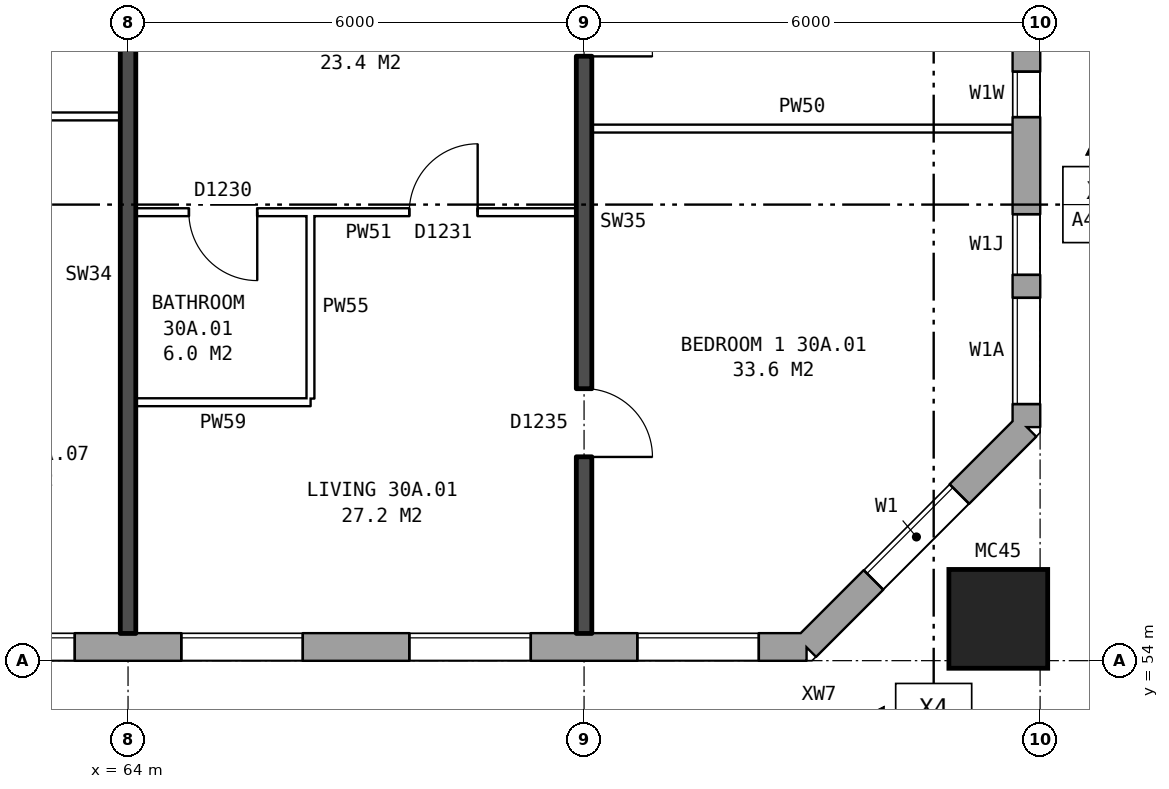
"""IFC4 building model, lengths in metres.
Left out: names, types, materials, properties, quantities, classifications, styles, units other than length and angle.
Written with IfcOpenShell. Run it as: python <this file> out.ifc"""

import sys

from ifc_helpers import new_model, si_unit, direction, frame, frame_2d, origin, origin_2d, place, context, subcontext, project, spatial, rectangle, hollow_rectangle, extrude, element, fill, save


model = new_model("IFC4")
c1 = context("Model", 3, precision=1e-05, world=origin(), true_north=direction((0.0, 1.0)))
c2 = subcontext(c1, "Body", "Model", "MODEL_VIEW")
j1 = project(units=[si_unit("LENGTHUNIT", "METRE"), si_unit("PLANEANGLEUNIT", "RADIAN")], contexts=[c1])
p1 = place(None, origin())
s1 = spatial("IfcSite", under=j1, at=p1, CompositionType="ELEMENT")
p2 = place(p1, origin())
s2 = spatial("IfcBuilding", under=s1, at=p2, CompositionType="ELEMENT")
p3 = place(p2, frame((0.0, 0.0, 108.8)))
s3 = spatial("IfcBuildingStorey", under=s2, at=p3, CompositionType="ELEMENT", Elevation=108.8)
p4 = place(p3, frame((75.45, 54.55, 0.0), z_axis=(0.0, 0.0, 1.0), x_axis=(1.0, 0.0, 0.0)))
e1 = element("IfcColumn", 1, at=p4, inside=s3, PredefinedType="COLUMN", context=c2, shape_type="SweptSolid", body=[
    extrude(hollow_rectangle(XDim=1.3, YDim=1.3, WallThickness=0.07, at=origin_2d()), origin(), (0.0, 0.0, 1.0), 3.1),
])
p5 = place(p3, frame((28.075, 54.18, 0.0), z_axis=(0.0, 0.0, 1.0), x_axis=(1.0, 0.0, 0.0)))
e2 = element("IfcWall", 2, at=p5, inside=s3, PredefinedType="STANDARD", context=c2, shape_type="SweptSolid", body=[
    extrude(rectangle(XDim=44.851, YDim=0.36, at=frame_2d((22.425, 0.0))), origin(), (0.0, 0.0, 1.0), 2.85),
])
p6 = place(p5, frame((0.625, 0.0, 0.8)))
e3 = element("IfcOpeningElement", 3, at=p6, cuts=e2, PredefinedType="OPENING", context=c2, shape_type="SweptSolid", body=[
    extrude(rectangle(XDim=1.6, YDim=1.8, at=frame_2d((0.8, 0.9))), frame((0.0, 0.19, 0.0), z_axis=(0.0, -1.0, 0.0), x_axis=(1.0, 0.0, 0.0)), (0.0, 0.0, 1.0), 0.38),
])
p7 = place(p5, frame((3.625, 0.0, 0.8)))
e4 = element("IfcOpeningElement", 4, at=p7, cuts=e2, PredefinedType="OPENING", context=c2, shape_type="SweptSolid", body=[
    extrude(rectangle(XDim=1.6, YDim=1.8, at=frame_2d((0.8, 0.9))), frame((0.0, 0.19, 0.0), z_axis=(0.0, -1.0, 0.0), x_axis=(1.0, 0.0, 0.0)), (0.0, 0.0, 1.0), 0.38),
])
p8 = place(p5, frame((6.625, 0.0, 0.8)))
e5 = element("IfcOpeningElement", 5, at=p8, cuts=e2, PredefinedType="OPENING", context=c2, shape_type="SweptSolid", body=[
    extrude(rectangle(XDim=1.6, YDim=1.8, at=frame_2d((0.8, 0.9))), frame((0.0, 0.19, 0.0), z_axis=(0.0, -1.0, 0.0), x_axis=(1.0, 0.0, 0.0)), (0.0, 0.0, 1.0), 0.38),
])
p9 = place(p5, frame((9.625, 0.0, 0.8)))
e6 = element("IfcOpeningElement", 6, at=p9, cuts=e2, PredefinedType="OPENING", context=c2, shape_type="SweptSolid", body=[
    extrude(rectangle(XDim=1.6, YDim=1.8, at=frame_2d((0.8, 0.9))), frame((0.0, 0.19, 0.0), z_axis=(0.0, -1.0, 0.0), x_axis=(1.0, 0.0, 0.0)), (0.0, 0.0, 1.0), 0.38),
])
p10 = place(p5, frame((12.625, 0.0, 0.8)))
e7 = element("IfcOpeningElement", 7, at=p10, cuts=e2, PredefinedType="OPENING", context=c2, shape_type="SweptSolid", body=[
    extrude(rectangle(XDim=1.6, YDim=1.8, at=frame_2d((0.8, 0.9))), frame((0.0, 0.19, 0.0), z_axis=(0.0, -1.0, 0.0), x_axis=(1.0, 0.0, 0.0)), (0.0, 0.0, 1.0), 0.38),
])
p11 = place(p5, frame((14.525, 0.0, 1.4)))
e8 = element("IfcOpeningElement", 8, at=p11, cuts=e2, PredefinedType="OPENING", context=c2, shape_type="SweptSolid", body=[
    extrude(rectangle(XDim=1.2, YDim=1.2, at=frame_2d((0.6, 0.6))), frame((0.0, 0.19, 0.0), z_axis=(0.0, -1.0, 0.0), x_axis=(1.0, 0.0, 0.0)), (0.0, 0.0, 1.0), 0.38),
])
p12 = place(p5, frame((18.625, 0.0, 0.8)))
e9 = element("IfcOpeningElement", 9, at=p12, cuts=e2, PredefinedType="OPENING", context=c2, shape_type="SweptSolid", body=[
    extrude(rectangle(XDim=1.6, YDim=1.8, at=frame_2d((0.8, 0.9))), frame((0.0, 0.19, 0.0), z_axis=(0.0, -1.0, 0.0), x_axis=(1.0, 0.0, 0.0)), (0.0, 0.0, 1.0), 0.38),
])
p13 = place(p5, frame((21.625, 0.0, 0.8)))
e10 = element("IfcOpeningElement", 10, at=p13, cuts=e2, PredefinedType="OPENING", context=c2, shape_type="SweptSolid", body=[
    extrude(rectangle(XDim=1.6, YDim=1.8, at=frame_2d((0.8, 0.9))), frame((0.0, 0.19, 0.0), z_axis=(0.0, -1.0, 0.0), x_axis=(1.0, 0.0, 0.0)), (0.0, 0.0, 1.0), 0.38),
])
p14 = place(p5, frame((24.625, 0.0, 0.8)))
e11 = element("IfcOpeningElement", 11, at=p14, cuts=e2, PredefinedType="OPENING", context=c2, shape_type="SweptSolid", body=[
    extrude(rectangle(XDim=1.6, YDim=1.8, at=frame_2d((0.8, 0.9))), frame((0.0, 0.19, 0.0), z_axis=(0.0, -1.0, 0.0), x_axis=(1.0, 0.0, 0.0)), (0.0, 0.0, 1.0), 0.38),
])
p15 = place(p5, frame((27.075, 0.0, 0.15)))
e12 = element("IfcOpeningElement", 12, at=p15, cuts=e2, PredefinedType="OPENING", context=c2, shape_type="SweptSolid", body=[
    extrude(rectangle(XDim=1.2, YDim=0.9, at=frame_2d((0.6, 0.45))), frame((0.0, 0.19, 0.0), z_axis=(0.0, -1.0, 0.0), x_axis=(1.0, 0.0, 0.0)), (0.0, 0.0, 1.0), 0.38),
])
p16 = place(p5, frame((30.625, 0.0, 0.8)))
e13 = element("IfcOpeningElement", 13, at=p16, cuts=e2, PredefinedType="OPENING", context=c2, shape_type="SweptSolid", body=[
    extrude(rectangle(XDim=1.6, YDim=1.8, at=frame_2d((0.8, 0.9))), frame((0.0, 0.19, 0.0), z_axis=(0.0, -1.0, 0.0), x_axis=(1.0, 0.0, 0.0)), (0.0, 0.0, 1.0), 0.38),
])
p17 = place(p5, frame((33.625, 0.0, 0.8)))
e14 = element("IfcOpeningElement", 14, at=p17, cuts=e2, PredefinedType="OPENING", context=c2, shape_type="SweptSolid", body=[
    extrude(rectangle(XDim=1.6, YDim=1.8, at=frame_2d((0.8, 0.9))), frame((0.0, 0.19, 0.0), z_axis=(0.0, -1.0, 0.0), x_axis=(1.0, 0.0, 0.0)), (0.0, 0.0, 1.0), 0.38),
])
p18 = place(p5, frame((36.625, 0.0, 0.8)))
e15 = element("IfcOpeningElement", 15, at=p18, cuts=e2, PredefinedType="OPENING", context=c2, shape_type="SweptSolid", body=[
    extrude(rectangle(XDim=1.6, YDim=1.8, at=frame_2d((0.8, 0.9))), frame((0.0, 0.19, 0.0), z_axis=(0.0, -1.0, 0.0), x_axis=(1.0, 0.0, 0.0)), (0.0, 0.0, 1.0), 0.38),
])
p19 = place(p5, frame((39.625, 0.0, 0.8)))
e16 = element("IfcOpeningElement", 16, at=p19, cuts=e2, PredefinedType="OPENING", context=c2, shape_type="SweptSolid", body=[
    extrude(rectangle(XDim=1.6, YDim=1.8, at=frame_2d((0.8, 0.9))), frame((0.0, 0.19, 0.0), z_axis=(0.0, -1.0, 0.0), x_axis=(1.0, 0.0, 0.0)), (0.0, 0.0, 1.0), 0.38),
])
p20 = place(p5, frame((42.625, 0.0, 0.8)))
e17 = element("IfcOpeningElement", 17, at=p20, cuts=e2, PredefinedType="OPENING", context=c2, shape_type="SweptSolid", body=[
    extrude(rectangle(XDim=1.6, YDim=1.8, at=frame_2d((0.8, 0.9))), frame((0.0, 0.19, 0.0), z_axis=(0.0, -1.0, 0.0), x_axis=(1.0, 0.0, 0.0)), (0.0, 0.0, 1.0), 0.38),
])
p21 = place(p5, frame((28.725, 0.0, 1.65)))
e18 = element("IfcOpeningElement", 18, at=p21, cuts=e2, PredefinedType="OPENING", context=c2, shape_type="SweptSolid", body=[
    extrude(rectangle(XDim=1.0, YDim=0.9, at=frame_2d((0.5, 0.45))), frame((0.0, 0.19, 0.0), z_axis=(0.0, -1.0, 0.0), x_axis=(1.0, 0.0, 0.0)), (0.0, 0.0, 1.0), 0.38),
])
p22 = place(p3, frame((72.925, 54.18, 0.0), z_axis=(0.0, 0.0, 1.0), x_axis=(0.707106781187, 0.707106781187, 0.0)))
e19 = element("IfcWall", 19, at=p22, inside=s3, PredefinedType="STANDARD", context=c2, shape_type="SweptSolid", body=[
    extrude(rectangle(XDim=4.094, YDim=0.36, at=frame_2d((2.047, 0.0))), origin(), (0.0, 0.0, 1.0), 2.85),
])
p23 = place(p22, frame((1.247, 0.0, 0.8)))
e20 = element("IfcOpeningElement", 20, at=p23, cuts=e19, PredefinedType="OPENING", context=c2, shape_type="SweptSolid", body=[
    extrude(rectangle(XDim=1.6, YDim=1.8, at=frame_2d((0.8, 0.9))), frame((0.0, 0.19, 0.0), z_axis=(0.0, -1.0, 0.0), x_axis=(1.0, 0.0, 0.0)), (0.0, 0.0, 1.0), 0.38),
])
p24 = place(p3, frame((75.82, 57.075, 0.0), z_axis=(0.0, 0.0, 1.0), x_axis=(0.0, 1.0, 0.0)))
e21 = element("IfcWall", 21, at=p24, inside=s3, PredefinedType="STANDARD", context=c2, shape_type="SweptSolid", body=[
    extrude(rectangle(XDim=25.851, YDim=0.36, at=frame_2d((12.925, 0.0))), origin(), (0.0, 0.0, 1.0), 2.85),
])
p25 = place(p24, frame((0.3, 0.0, 0.8)))
e22 = element("IfcOpeningElement", 22, at=p25, cuts=e21, PredefinedType="OPENING", context=c2, shape_type="SweptSolid", body=[
    extrude(rectangle(XDim=1.4, YDim=1.8, at=frame_2d((0.7, 0.9))), frame((0.0, 0.19, 0.0), z_axis=(0.0, -1.0, 0.0), x_axis=(1.0, 0.0, 0.0)), (0.0, 0.0, 1.0), 0.38),
])
p26 = place(p24, frame((4.075, 0.0, 0.25)))
e23 = element("IfcOpeningElement", 23, at=p26, cuts=e21, PredefinedType="OPENING", context=c2, shape_type="SweptSolid", body=[
    extrude(rectangle(XDim=0.6, YDim=0.9, at=frame_2d((0.3, 0.45))), frame((0.0, 0.19, 0.0), z_axis=(0.0, -1.0, 0.0), x_axis=(1.0, 0.0, 0.0)), (0.0, 0.0, 1.0), 0.38),
])
p27 = place(p24, frame((19.225, 0.0, 1.7)))
e24 = element("IfcOpeningElement", 24, at=p27, cuts=e21, PredefinedType="OPENING", context=c2, shape_type="SweptSolid", body=[
    extrude(rectangle(XDim=1.6, YDim=0.9, at=frame_2d((0.8, 0.45))), frame((0.0, 0.19, 0.0), z_axis=(0.0, -1.0, 0.0), x_axis=(1.0, 0.0, 0.0)), (0.0, 0.0, 1.0), 0.38),
])
p28 = place(p24, frame((21.975, 0.0, 0.8)))
e25 = element("IfcOpeningElement", 25, at=p28, cuts=e21, PredefinedType="OPENING", context=c2, shape_type="SweptSolid", body=[
    extrude(rectangle(XDim=1.2, YDim=0.9, at=frame_2d((0.6, 0.45))), frame((0.0, 0.19, 0.0), z_axis=(0.0, -1.0, 0.0), x_axis=(1.0, 0.0, 0.0)), (0.0, 0.0, 1.0), 0.38),
])
p29 = place(p24, frame((2.0, 0.0, 0.8)))
e26 = element("IfcOpeningElement", 26, at=p29, cuts=e21, PredefinedType="OPENING", context=c2, shape_type="SweptSolid", body=[
    extrude(rectangle(XDim=0.8, YDim=1.5, at=frame_2d((0.4, 0.75))), frame((0.0, 0.19, 0.0), z_axis=(0.0, -1.0, 0.0), x_axis=(1.0, 0.0, 0.0)), (0.0, 0.0, 1.0), 0.38),
])
p30 = place(p24, frame((5.075, 0.0, 1.65)))
e27 = element("IfcOpeningElement", 27, at=p30, cuts=e21, PredefinedType="OPENING", context=c2, shape_type="SweptSolid", body=[
    extrude(rectangle(XDim=1.4, YDim=0.9, at=frame_2d((0.7, 0.45))), frame((0.0, 0.19, 0.0), z_axis=(0.0, -1.0, 0.0), x_axis=(1.0, 0.0, 0.0)), (0.0, 0.0, 1.0), 0.38),
])
p31 = place(p24, frame((23.475, 0.0, 0.8)))
e28 = element("IfcOpeningElement", 28, at=p31, cuts=e21, PredefinedType="OPENING", context=c2, shape_type="SweptSolid", body=[
    extrude(rectangle(XDim=1.2, YDim=1.8, at=frame_2d((0.6, 0.9))), frame((0.0, 0.19, 0.0), z_axis=(0.0, -1.0, 0.0), x_axis=(1.0, 0.0, 0.0)), (0.0, 0.0, 1.0), 0.38),
])
p32 = place(p3, frame((64.1, 57.4, 0.0), z_axis=(0.0, 0.0, 1.0), x_axis=(1.0, 0.0, 0.0)))
e29 = element("IfcWall", 29, at=p32, inside=s3, PredefinedType="PARTITIONING", context=c2, shape_type="SweptSolid", body=[
    extrude(rectangle(XDim=2.3, YDim=0.1, at=frame_2d((1.15, 0.0))), origin(), (0.0, 0.0, 1.0), 2.85),
])
p33 = place(p3, frame((64.1, 59.9, 0.0), z_axis=(0.0, 0.0, 1.0), x_axis=(1.0, 0.0, 0.0)))
e30 = element("IfcWall", 30, at=p33, inside=s3, PredefinedType="PARTITIONING", context=c2, shape_type="SweptSolid", body=[
    extrude(rectangle(XDim=5.8, YDim=0.1, at=frame_2d((2.9, 0.0))), origin(), (0.0, 0.0, 1.0), 2.85),
])
p34 = place(p33, frame((3.6, 0.0, 0.0)))
e31 = element("IfcOpeningElement", 31, at=p34, cuts=e30, PredefinedType="OPENING", context=c2, shape_type="SweptSolid", body=[
    extrude(rectangle(XDim=0.9, YDim=2.1, at=frame_2d((0.45, 1.05))), frame((0.0, 0.06, 0.0), z_axis=(0.0, -1.0, 0.0), x_axis=(1.0, 0.0, 0.0)), (0.0, 0.0, 1.0), 0.12),
])
p35 = place(p33, frame((0.7, 0.0, 0.0)))
e32 = element("IfcOpeningElement", 32, at=p35, cuts=e30, PredefinedType="OPENING", context=c2, shape_type="SweptSolid", body=[
    extrude(rectangle(XDim=0.9, YDim=2.1, at=frame_2d((0.45, 1.05))), frame((0.0, 0.06, 0.0), z_axis=(0.0, -1.0, 0.0), x_axis=(1.0, 0.0, 0.0)), (0.0, 0.0, 1.0), 0.12),
])
p36 = place(p3, frame((70.1, 61.0, 0.0), z_axis=(0.0, 0.0, 1.0), x_axis=(1.0, 0.0, 0.0)))
e33 = element("IfcWall", 33, at=p36, inside=s3, PredefinedType="PARTITIONING", context=c2, shape_type="SweptSolid", body=[
    extrude(rectangle(XDim=5.54, YDim=0.1, at=frame_2d((2.77, 0.0))), origin(), (0.0, 0.0, 1.0), 2.85),
])
p37 = place(p3, frame((61.0, 61.16, 0.0), z_axis=(0.0, 0.0, 1.0), x_axis=(1.0, 0.0, 0.0)))
e34 = element("IfcWall", 34, at=p37, inside=s3, PredefinedType="PARTITIONING", context=c2, shape_type="SweptSolid", body=[
    extrude(rectangle(XDim=2.9, YDim=0.1, at=frame_2d((1.45, 0.0))), origin(), (0.0, 0.0, 1.0), 2.85),
])
p38 = place(p37, frame((1.0, 0.0, 0.0)))
e35 = element("IfcOpeningElement", 35, at=p38, cuts=e34, PredefinedType="OPENING", context=c2, shape_type="SweptSolid", body=[
    extrude(rectangle(XDim=0.9, YDim=2.1, at=frame_2d((0.45, 1.05))), frame((0.0, 0.06, 0.0), z_axis=(0.0, -1.0, 0.0), x_axis=(1.0, 0.0, 0.0)), (0.0, 0.0, 1.0), 0.12),
])
p39 = place(p3, frame((64.0, 54.36, 0.0), z_axis=(0.0, 0.0, 1.0), x_axis=(0.0, 1.0, 0.0)))
e36 = element("IfcWall", 36, at=p39, inside=s3, PredefinedType="SOLIDWALL", context=c2, shape_type="SweptSolid", body=[
    extrude(rectangle(XDim=9.44, YDim=0.2, at=frame_2d((4.72, 0.0))), origin(), (0.0, 0.0, 1.0), 2.85),
])
p40 = place(p3, frame((66.4, 57.45, 0.0), z_axis=(0.0, 0.0, 1.0), x_axis=(0.0, 1.0, 0.0)))
e37 = element("IfcWall", 37, at=p40, inside=s3, PredefinedType="PARTITIONING", context=c2, shape_type="SweptSolid", body=[
    extrude(rectangle(XDim=2.4, YDim=0.1, at=frame_2d((1.2, 0.0))), origin(), (0.0, 0.0, 1.0), 2.85),
])
p41 = place(p3, frame((70.0, 54.36, 0.0), z_axis=(0.0, 0.0, 1.0), x_axis=(0.0, 1.0, 0.0)))
e38 = element("IfcWall", 38, at=p41, inside=s3, PredefinedType="SOLIDWALL", context=c2, shape_type="SweptSolid", body=[
    extrude(rectangle(XDim=9.44, YDim=0.2, at=frame_2d((4.72, 0.0))), origin(), (0.0, 0.0, 1.0), 2.85),
])
p42 = place(p41, frame((2.32, 0.0, 0.0)))
e39 = element("IfcOpeningElement", 39, at=p42, cuts=e38, PredefinedType="OPENING", context=c2, shape_type="SweptSolid", body=[
    extrude(rectangle(XDim=0.9, YDim=2.1, at=frame_2d((0.45, 1.05))), frame((0.0, 0.11, 0.0), z_axis=(0.0, -1.0, 0.0), x_axis=(1.0, 0.0, 0.0)), (0.0, 0.0, 1.0), 0.22),
])
p43 = place(p41, frame((7.59, 0.0, 0.0)))
e40 = element("IfcOpeningElement", 40, at=p43, cuts=e38, PredefinedType="OPENING", context=c2, shape_type="SweptSolid", body=[
    extrude(rectangle(XDim=0.9, YDim=2.1, at=frame_2d((0.45, 1.05))), frame((0.0, 0.11, 0.0), z_axis=(0.0, -1.0, 0.0), x_axis=(1.0, 0.0, 0.0)), (0.0, 0.0, 1.0), 0.22),
])
p44 = place(p17, origin())
e41 = element("IfcWindow", 41, at=p44, inside=s3, PartitioningType="SINGLE_PANEL", PredefinedType="WINDOW", context=c2, shape_type="SweptSolid", body=[
    extrude(rectangle(XDim=1.6, YDim=1.8, at=frame_2d((0.8, 0.9))), frame((0.0, 0.15, 0.0), z_axis=(0.0, -1.0, 0.0), x_axis=(1.0, 0.0, 0.0)), (0.0, 0.0, 1.0), 0.06),
])
fill(e14, e41)
p45 = place(p18, origin())
e42 = element("IfcWindow", 42, at=p45, inside=s3, PartitioningType="SINGLE_PANEL", PredefinedType="WINDOW", context=c2, shape_type="SweptSolid", body=[
    extrude(rectangle(XDim=1.6, YDim=1.8, at=frame_2d((0.8, 0.9))), frame((0.0, 0.15, 0.0), z_axis=(0.0, -1.0, 0.0), x_axis=(1.0, 0.0, 0.0)), (0.0, 0.0, 1.0), 0.06),
])
fill(e15, e42)
p46 = place(p19, origin())
e43 = element("IfcWindow", 43, at=p46, inside=s3, PartitioningType="SINGLE_PANEL", PredefinedType="WINDOW", context=c2, shape_type="SweptSolid", body=[
    extrude(rectangle(XDim=1.6, YDim=1.8, at=frame_2d((0.8, 0.9))), frame((0.0, 0.15, 0.0), z_axis=(0.0, -1.0, 0.0), x_axis=(1.0, 0.0, 0.0)), (0.0, 0.0, 1.0), 0.06),
])
fill(e16, e43)
p47 = place(p20, origin())
e44 = element("IfcWindow", 44, at=p47, inside=s3, PartitioningType="SINGLE_PANEL", PredefinedType="WINDOW", context=c2, shape_type="SweptSolid", body=[
    extrude(rectangle(XDim=1.6, YDim=1.8, at=frame_2d((0.8, 0.9))), frame((0.0, 0.15, 0.0), z_axis=(0.0, -1.0, 0.0), x_axis=(1.0, 0.0, 0.0)), (0.0, 0.0, 1.0), 0.06),
])
fill(e17, e44)
p48 = place(p23, origin())
e45 = element("IfcWindow", 45, at=p48, inside=s3, PartitioningType="SINGLE_PANEL", PredefinedType="WINDOW", context=c2, shape_type="SweptSolid", body=[
    extrude(rectangle(XDim=1.6, YDim=1.8, at=frame_2d((0.8, 0.9))), frame((0.0, 0.15, 0.0), z_axis=(0.0, -1.0, 0.0), x_axis=(1.0, 0.0, 0.0)), (0.0, 0.0, 1.0), 0.06),
])
fill(e20, e45)
p49 = place(p25, origin())
e46 = element("IfcWindow", 46, at=p49, inside=s3, PartitioningType="SINGLE_PANEL", PredefinedType="WINDOW", context=c2, shape_type="SweptSolid", body=[
    extrude(rectangle(XDim=1.4, YDim=1.8, at=frame_2d((0.7, 0.9))), frame((0.0, 0.15, 0.0), z_axis=(0.0, -1.0, 0.0), x_axis=(1.0, 0.0, 0.0)), (0.0, 0.0, 1.0), 0.06),
])
fill(e22, e46)
p50 = place(p26, origin())
e47 = element("IfcWindow", 47, at=p50, inside=s3, PartitioningType="SINGLE_PANEL", PredefinedType="WINDOW", context=c2, shape_type="SweptSolid", body=[
    extrude(rectangle(XDim=0.6, YDim=0.9, at=frame_2d((0.3, 0.45))), frame((0.0, 0.15, 0.0), z_axis=(0.0, -1.0, 0.0), x_axis=(1.0, 0.0, 0.0)), (0.0, 0.0, 1.0), 0.06),
])
fill(e23, e47)
p51 = place(p42, frame((0.9, 0.0, 0.0), z_axis=(0.0, 0.0, 1.0), x_axis=(-1.0, 0.0, 0.0)))
e48 = element("IfcDoor", 48, at=p51, inside=s3, OperationType="SINGLE_SWING_RIGHT", PredefinedType="DOOR", context=c2, shape_type="SweptSolid", body=[
    extrude(rectangle(XDim=0.9, YDim=2.1, at=frame_2d((0.45, 1.05))), frame((0.0, 0.025, 0.0), z_axis=(0.0, -1.0, 0.0), x_axis=(1.0, 0.0, 0.0)), (0.0, 0.0, 1.0), 0.05),
])
fill(e39, e48)
p52 = place(p43, frame((0.9, 0.0, 0.0), z_axis=(0.0, 0.0, 1.0), x_axis=(-1.0, 0.0, 0.0)))
e49 = element("IfcDoor", 49, at=p52, inside=s3, OperationType="SINGLE_SWING_RIGHT", PredefinedType="DOOR", context=c2, shape_type="SweptSolid", body=[
    extrude(rectangle(XDim=0.9, YDim=2.1, at=frame_2d((0.45, 1.05))), frame((0.0, 0.025, 0.0), z_axis=(0.0, -1.0, 0.0), x_axis=(1.0, 0.0, 0.0)), (0.0, 0.0, 1.0), 0.05),
])
fill(e40, e49)
p53 = place(p34, origin())
e50 = element("IfcDoor", 50, at=p53, inside=s3, OperationType="SINGLE_SWING_RIGHT", PredefinedType="DOOR", context=c2, shape_type="SweptSolid", body=[
    extrude(rectangle(XDim=0.9, YDim=2.1, at=frame_2d((0.45, 1.05))), frame((0.0, 0.025, 0.0), z_axis=(0.0, -1.0, 0.0), x_axis=(1.0, 0.0, 0.0)), (0.0, 0.0, 1.0), 0.05),
])
fill(e31, e50)
p54 = place(p35, frame((0.9, 0.0, 0.0), z_axis=(0.0, 0.0, 1.0), x_axis=(-1.0, 0.0, 0.0)))
e51 = element("IfcDoor", 51, at=p54, inside=s3, OperationType="SINGLE_SWING_LEFT", PredefinedType="DOOR", context=c2, shape_type="SweptSolid", body=[
    extrude(rectangle(XDim=0.9, YDim=2.1, at=frame_2d((0.45, 1.05))), frame((0.0, 0.025, 0.0), z_axis=(0.0, -1.0, 0.0), x_axis=(1.0, 0.0, 0.0)), (0.0, 0.0, 1.0), 0.05),
])
fill(e32, e51)
p55 = place(p29, origin())
e52 = element("IfcWindow", 52, at=p55, inside=s3, PartitioningType="SINGLE_PANEL", PredefinedType="WINDOW", context=c2, shape_type="SweptSolid", body=[
    extrude(rectangle(XDim=0.8, YDim=1.5, at=frame_2d((0.4, 0.75))), frame((0.0, 0.15, 0.0), z_axis=(0.0, -1.0, 0.0), x_axis=(1.0, 0.0, 0.0)), (0.0, 0.0, 1.0), 0.06),
])
fill(e26, e52)
save(model, sys.argv[1])
